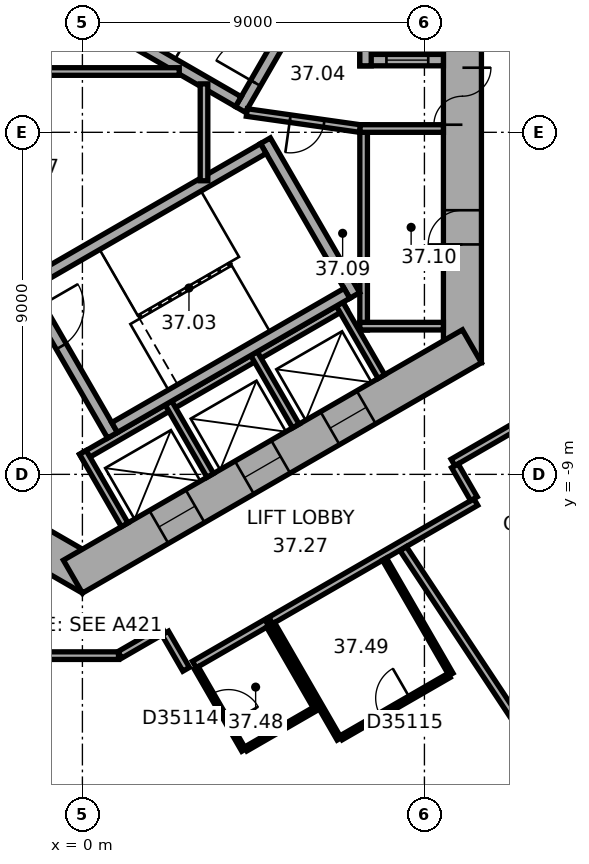
"""IFC4 building model, lengths in metres.
Left out: names, types, materials, properties, quantities, classifications, styles, units other than length and angle.
Written with IfcOpenShell. Run it as: python <this file> out.ifc"""

import sys

from ifc_helpers import new_model, si_unit, direction, frame, frame_2d, origin, place, context, subcontext, project, spatial, rectangle, extrude, element, fill, save


model = new_model("IFC4")
c1 = context("Model", 3, precision=1e-05, world=origin(), true_north=direction((0.0, 1.0)))
c2 = subcontext(c1, "Body", "Model", "MODEL_VIEW")
j1 = project(units=[si_unit("LENGTHUNIT", "METRE"), si_unit("PLANEANGLEUNIT", "RADIAN")], contexts=[c1])
p1 = place(None, origin())
s1 = spatial("IfcSite", under=j1, at=p1, CompositionType="ELEMENT")
p2 = place(p1, origin())
s2 = spatial("IfcBuilding", under=s1, at=p2, CompositionType="ELEMENT")
p3 = place(p2, frame((0.0, 0.0, 154.0)))
s3 = spatial("IfcBuildingStorey", under=s2, at=p3, CompositionType="ELEMENT", Elevation=154.0)
p4 = place(p3, frame((10.0, -6.062, 0.0), z_axis=(0.0, 0.0, 1.0), x_axis=(0.0, 1.0, 0.0)))
e1 = element("IfcWall", 1, at=p4, inside=s3, PredefinedType="SHEAR", context=c2, shape_type="SweptSolid", body=[
    extrude(rectangle(XDim=12.125, YDim=1.0, at=frame_2d((6.062, 0.0))), origin(), (0.0, 0.0, 1.0), 3.7),
])
p5 = place(p4, frame((6.262, 0.0, 0.0)))
e2 = element("IfcOpeningElement", 2, at=p5, cuts=e1, PredefinedType="OPENING", context=c2, shape_type="SweptSolid", body=[
    extrude(rectangle(XDim=1.5, YDim=2.1, at=frame_2d((0.75, 1.05))), frame((0.0, 0.51, 0.0), z_axis=(0.0, -1.0, 0.0), x_axis=(1.0, 0.0, 0.0)), (0.0, 0.0, 1.0), 1.02),
])
p6 = place(p4, frame((3.112, 0.0, 0.0)))
e3 = element("IfcOpeningElement", 3, at=p6, cuts=e1, PredefinedType="OPENING", context=c2, shape_type="SweptSolid", body=[
    extrude(rectangle(XDim=0.9, YDim=2.1, at=frame_2d((0.45, 1.05))), frame((0.0, 0.51, 0.0), z_axis=(0.0, -1.0, 0.0), x_axis=(1.0, 0.0, 0.0)), (0.0, 0.0, 1.0), 1.02),
])
p7 = place(p3, frame((-10.25, -5.629, 0.0), z_axis=(0.0, 0.0, 1.0), x_axis=(0.866022616891, -0.50000482701, 0.0)))
e4 = element("IfcWall", 4, at=p7, inside=s3, PredefinedType="SHEAR", context=c2, shape_type="SweptSolid", body=[
    extrude(rectangle(XDim=12.125, YDim=1.0, at=frame_2d((6.062, 0.0))), origin(), (0.0, 0.0, 1.0), 3.7),
])
p8 = place(p7, frame((6.262, 0.0, 0.0)))
e5 = element("IfcOpeningElement", 5, at=p8, cuts=e4, PredefinedType="OPENING", context=c2, shape_type="SweptSolid", body=[
    extrude(rectangle(XDim=1.5, YDim=2.1, at=frame_2d((0.75, 1.05))), frame((0.0, 0.51, 0.0), z_axis=(0.0, -1.0, 0.0), x_axis=(1.0, 0.0, 0.0)), (0.0, 0.0, 1.0), 1.02),
])
p9 = place(p7, frame((1.712, 0.0, 0.0)))
e6 = element("IfcOpeningElement", 6, at=p9, cuts=e4, PredefinedType="OPENING", context=c2, shape_type="SweptSolid", body=[
    extrude(rectangle(XDim=1.1, YDim=2.1, at=frame_2d((0.55, 1.05))), frame((0.0, 0.51, 0.0), z_axis=(0.0, -1.0, 0.0), x_axis=(1.0, 0.0, 0.0)), (0.0, 0.0, 1.0), 1.02),
])
p10 = place(p7, frame((4.312, 0.0, 0.0)))
e7 = element("IfcOpeningElement", 7, at=p10, cuts=e4, PredefinedType="OPENING", context=c2, shape_type="SweptSolid", body=[
    extrude(rectangle(XDim=1.1, YDim=2.1, at=frame_2d((0.55, 1.05))), frame((0.0, 0.51, 0.0), z_axis=(0.0, -1.0, 0.0), x_axis=(1.0, 0.0, 0.0)), (0.0, 0.0, 1.0), 1.02),
])
p11 = place(p3, frame((-0.25, -11.691, 0.0), z_axis=(0.0, 0.0, 1.0), x_axis=(0.866022616891, 0.50000482701, 0.0)))
e8 = element("IfcWall", 8, at=p11, inside=s3, PredefinedType="SHEAR", context=c2, shape_type="SweptSolid", body=[
    extrude(rectangle(XDim=12.125, YDim=1.0, at=frame_2d((6.062, 0.0))), origin(), (0.0, 0.0, 1.0), 3.7),
])
p12 = place(p11, frame((2.612, 0.0, 0.0)))
e9 = element("IfcOpeningElement", 9, at=p12, cuts=e8, PredefinedType="OPENING", context=c2, shape_type="SweptSolid", body=[
    extrude(rectangle(XDim=1.1, YDim=2.1, at=frame_2d((0.55, 1.05))), frame((0.0, 0.51, 0.0), z_axis=(0.0, -1.0, 0.0), x_axis=(1.0, 0.0, 0.0)), (0.0, 0.0, 1.0), 1.02),
])
p13 = place(p11, frame((5.212, 0.0, 0.0)))
e10 = element("IfcOpeningElement", 10, at=p13, cuts=e8, PredefinedType="OPENING", context=c2, shape_type="SweptSolid", body=[
    extrude(rectangle(XDim=1.1, YDim=2.1, at=frame_2d((0.55, 1.05))), frame((0.0, 0.51, 0.0), z_axis=(0.0, -1.0, 0.0), x_axis=(1.0, 0.0, 0.0)), (0.0, 0.0, 1.0), 1.02),
])
p14 = place(p11, frame((7.812, 0.0, 0.0)))
e11 = element("IfcOpeningElement", 11, at=p14, cuts=e8, PredefinedType="OPENING", context=c2, shape_type="SweptSolid", body=[
    extrude(rectangle(XDim=1.1, YDim=2.1, at=frame_2d((0.55, 1.05))), frame((0.0, 0.51, 0.0), z_axis=(0.0, -1.0, 0.0), x_axis=(1.0, 0.0, 0.0)), (0.0, 0.0, 1.0), 1.02),
])
p15 = place(p3, frame((2.911, -24.156, 0.0), z_axis=(0.0, 0.0, 1.0), x_axis=(0.833882163564, 0.551942512668, 0.0)))
e12 = element("IfcWall", 12, at=p15, inside=s3, PredefinedType="STANDARD", context=c2, shape_type="SweptSolid", body=[
    extrude(rectangle(XDim=20.044, YDim=0.2, at=frame_2d((10.022, 0.0))), origin(), (0.0, 0.0, 1.0), 3.7),
])
p16 = place(p15, frame((1.313, 0.0, 0.9)))
e13 = element("IfcOpeningElement", 13, at=p16, cuts=e12, PredefinedType="OPENING", context=c2, shape_type="SweptSolid", body=[
    extrude(rectangle(XDim=2.4, YDim=2.0, at=frame_2d((1.2, 1.0))), frame((0.0, 0.11, 0.0), z_axis=(0.0, -1.0, 0.0), x_axis=(1.0, 0.0, 0.0)), (0.0, 0.0, 1.0), 0.22),
])
p17 = place(p15, frame((5.067, 0.0, 0.9)))
e14 = element("IfcOpeningElement", 14, at=p17, cuts=e12, PredefinedType="OPENING", context=c2, shape_type="SweptSolid", body=[
    extrude(rectangle(XDim=2.4, YDim=2.0, at=frame_2d((1.2, 1.0))), frame((0.0, 0.11, 0.0), z_axis=(0.0, -1.0, 0.0), x_axis=(1.0, 0.0, 0.0)), (0.0, 0.0, 1.0), 0.22),
])
p18 = place(p15, frame((8.821, 0.0, 0.9)))
e15 = element("IfcOpeningElement", 15, at=p18, cuts=e12, PredefinedType="OPENING", context=c2, shape_type="SweptSolid", body=[
    extrude(rectangle(XDim=2.4, YDim=2.0, at=frame_2d((1.2, 1.0))), frame((0.0, 0.11, 0.0), z_axis=(0.0, -1.0, 0.0), x_axis=(1.0, 0.0, 0.0)), (0.0, 0.0, 1.0), 0.22),
])
p19 = place(p15, frame((12.575, 0.0, 0.9)))
e16 = element("IfcOpeningElement", 16, at=p19, cuts=e12, PredefinedType="OPENING", context=c2, shape_type="SweptSolid", body=[
    extrude(rectangle(XDim=2.4, YDim=2.0, at=frame_2d((1.2, 1.0))), frame((0.0, 0.11, 0.0), z_axis=(0.0, -1.0, 0.0), x_axis=(1.0, 0.0, 0.0)), (0.0, 0.0, 1.0), 0.22),
])
p20 = place(p15, frame((16.329, 0.0, 0.9)))
e17 = element("IfcOpeningElement", 17, at=p20, cuts=e12, PredefinedType="OPENING", context=c2, shape_type="SweptSolid", body=[
    extrude(rectangle(XDim=2.4, YDim=2.0, at=frame_2d((1.2, 1.0))), frame((0.0, 0.11, 0.0), z_axis=(0.0, -1.0, 0.0), x_axis=(1.0, 0.0, 0.0)), (0.0, 0.0, 1.0), 0.22),
])
p21 = place(p3, frame((7.4, -5.2, 0.0), z_axis=(0.0, 0.0, 1.0), x_axis=(0.0, 1.0, 0.0)))
e18 = element("IfcWall", 18, at=p21, inside=s3, PredefinedType="PARTITIONING", context=c2, shape_type="SweptSolid", body=[
    extrude(rectangle(XDim=5.4, YDim=0.2, at=frame_2d((2.7, 0.0))), origin(), (0.0, 0.0, 1.0), 3.42),
])
for number, where, z_axis, x_axis in (
    (19, (7.3, -5.1, 0.0), (0.0, 0.0, 1.0), (1.0, 0.0, 0.0)),
    (20, (7.3, 0.1, 0.0), (0.0, 0.0, 1.0), (1.0, 0.0, 0.0)),
):
    element("IfcWall", number, at=place(p3, frame(where, z_axis=z_axis, x_axis=x_axis)), inside=s3, PredefinedType="PARTITIONING", context=c2, shape_type="SweptSolid", body=[
        extrude(rectangle(XDim=2.2, YDim=0.2, at=frame_2d((1.1, 0.0))), origin(), (0.0, 0.0, 1.0), 3.42),
    ])
p22 = place(p3, frame((-0.024, -8.559, 0.0), z_axis=(0.0, 0.0, 1.0), x_axis=(0.866026010844, 0.49999894854, 0.0)))
e21 = element("IfcWall", 21, at=p22, inside=s3, PredefinedType="PARTITIONING", context=c2, shape_type="SweptSolid", body=[
    extrude(rectangle(XDim=8.0, YDim=0.2, at=frame_2d((4.0, 0.0))), origin(), (0.0, 0.0, 1.0), 3.42),
])
for number, where, z_axis, x_axis in (
    (22, (0.013, -8.422, 0.0), (0.0, 0.0, 1.0), (0.5, -0.866, 0.0)),
    (23, (2.264, -7.122, 0.0), (0.0, 0.0, 1.0), (0.5, -0.866, 0.0)),
    (24, (4.516, -5.822, 0.0), (0.0, 0.0, 1.0), (0.5, -0.866, 0.0)),
    (25, (6.768, -4.522, 0.0), (0.0, 0.0, 1.0), (0.5, -0.866, 0.0)),
):
    element("IfcWall", number, at=place(p3, frame(where, z_axis=z_axis, x_axis=x_axis)), inside=s3, PredefinedType="PARTITIONING", context=c2, shape_type="SweptSolid", body=[
        extrude(rectangle(XDim=2.2, YDim=0.2, at=frame_2d((1.1, 0.0))), origin(), (0.0, 0.0, 1.0), 3.42),
    ])
p23 = place(p3, frame((4.158, 0.602, 0.0), z_axis=(0.0, 0.0, 1.0), x_axis=(0.499977259774, 0.866038532462, 0.0)))
e26 = element("IfcWall", 26, at=p23, inside=s3, PredefinedType="SHEAR", context=c2, shape_type="SweptSolid", body=[
    extrude(rectangle(XDim=4.7, YDim=0.3, at=frame_2d((2.35, 0.0))), origin(), (0.0, 0.0, 1.0), 3.42),
])
p24 = place(p23, frame((0.8, 0.0, 0.0)))
e27 = element("IfcOpeningElement", 27, at=p24, cuts=e26, PredefinedType="OPENING", context=c2, shape_type="SweptSolid", body=[
    extrude(rectangle(XDim=1.2, YDim=2.1, at=frame_2d((0.6, 1.05))), frame((0.0, 0.16, 0.0), z_axis=(0.0, -1.0, 0.0), x_axis=(1.0, 0.0, 0.0)), (0.0, 0.0, 1.0), 0.32),
])
p25 = place(p3, frame((4.103, 0.807, 0.0), z_axis=(0.0, 0.0, 1.0), x_axis=(-0.866027801685, 0.499995846692, 0.0)))
e28 = element("IfcWall", 28, at=p25, inside=s3, PredefinedType="SHEAR", context=c2, shape_type="SweptSolid", body=[
    extrude(rectangle(XDim=7.06, YDim=0.3, at=frame_2d((3.53, 0.0))), origin(), (0.0, 0.0, 1.0), 3.42),
])
p26 = place(p3, frame((-1.558, -3.902, 0.0), z_axis=(0.0, 0.0, 1.0), x_axis=(0.499977259774, -0.866038532462, 0.0)))
e29 = element("IfcWall", 29, at=p26, inside=s3, PredefinedType="SHEAR", context=c2, shape_type="SweptSolid", body=[
    extrude(rectangle(XDim=4.7, YDim=0.3, at=frame_2d((2.35, 0.0))), origin(), (0.0, 0.0, 1.0), 3.42),
])
p27 = place(p26, frame((0.8, 0.0, 0.0)))
e30 = element("IfcOpeningElement", 30, at=p27, cuts=e29, PredefinedType="OPENING", context=c2, shape_type="SweptSolid", body=[
    extrude(rectangle(XDim=1.2, YDim=2.1, at=frame_2d((0.6, 1.05))), frame((0.0, 0.16, 0.0), z_axis=(0.0, -1.0, 0.0), x_axis=(1.0, 0.0, 0.0)), (0.0, 0.0, 1.0), 0.32),
])
p28 = place(p3, frame((4.816, -0.222, 0.0), z_axis=(0.0, 0.0, 1.0), x_axis=(0.499977259774, -0.866038532462, 0.0)))
e31 = element("IfcWall", 31, at=p28, inside=s3, PredefinedType="SHEAR", context=c2, shape_type="SweptSolid", body=[
    extrude(rectangle(XDim=4.7, YDim=0.3, at=frame_2d((2.35, 0.0))), origin(), (0.0, 0.0, 1.0), 3.42),
])
for number, where, z_axis, x_axis in (
    (32, (-1.353, -3.957, 0.0), (0.0, 0.0, 1.0), (0.866, 0.5, 0.0)),
    (33, (0.847, -7.767, 0.0), (0.0, 0.0, 1.0), (0.866, 0.5, 0.0)),
):
    element("IfcWall", number, at=place(p3, frame(where, z_axis=z_axis, x_axis=x_axis)), inside=s3, PredefinedType="SHEAR", context=c2, shape_type="SweptSolid", body=[
        extrude(rectangle(XDim=7.06, YDim=0.3, at=frame_2d((3.53, 0.0))), origin(), (0.0, 0.0, 1.0), 3.42),
    ])
p29 = place(p3, frame((7.3, 1.9, 0.0), z_axis=(0.0, 0.0, 1.0), x_axis=(1.0, 0.0, 0.0)))
e34 = element("IfcWall", 34, at=p29, inside=s3, PredefinedType="SHEAR", context=c2, shape_type="SweptSolid", body=[
    extrude(rectangle(XDim=2.2, YDim=0.3, at=frame_2d((1.1, 0.0))), origin(), (0.0, 0.0, 1.0), 3.42),
])
p30 = place(p29, frame((0.7, 0.0, 0.0)))
e35 = element("IfcOpeningElement", 35, at=p30, cuts=e34, PredefinedType="OPENING", context=c2, shape_type="SweptSolid", body=[
    extrude(rectangle(XDim=1.1, YDim=2.1, at=frame_2d((0.55, 1.05))), frame((0.0, 0.16, 0.0), z_axis=(0.0, -1.0, 0.0), x_axis=(1.0, 0.0, 0.0)), (0.0, 0.0, 1.0), 0.32),
])
p31 = place(p3, frame((7.45, 1.75, 0.0), z_axis=(0.0, 0.0, 1.0), x_axis=(0.0, 1.0, 0.0)))
e36 = element("IfcWall", 36, at=p31, inside=s3, PredefinedType="SHEAR", context=c2, shape_type="SweptSolid", body=[
    extrude(rectangle(XDim=3.35, YDim=0.3, at=frame_2d((1.675, 0.0))), origin(), (0.0, 0.0, 1.0), 3.42),
])
p32 = place(p3, frame((4.327, 0.521, 0.0), z_axis=(0.0, 0.0, 1.0), x_axis=(0.990124376366, -0.14019172346, 0.0)))
e37 = element("IfcWall", 37, at=p32, inside=s3, PredefinedType="PARTITIONING", context=c2, shape_type="SweptSolid", body=[
    extrude(rectangle(XDim=3.002, YDim=0.2, at=frame_2d((1.501, 0.0))), origin(), (0.0, 0.0, 1.0), 3.42),
])
p33 = place(p32, frame((1.15, 0.0, 0.0)))
e38 = element("IfcOpeningElement", 38, at=p33, cuts=e37, PredefinedType="OPENING", context=c2, shape_type="SweptSolid", body=[
    extrude(rectangle(XDim=0.9, YDim=2.1, at=frame_2d((0.45, 1.05))), frame((0.0, 0.11, 0.0), z_axis=(0.0, -1.0, 0.0), x_axis=(1.0, 0.0, 0.0)), (0.0, 0.0, 1.0), 0.22),
])
p34 = place(p3, frame((-2.72, 1.6, 0.0), z_axis=(0.0, 0.0, 1.0), x_axis=(1.0, 0.0, 0.0)))
e39 = element("IfcWall", 39, at=p34, inside=s3, PredefinedType="PARTITIONING", context=c2, shape_type="SweptSolid", body=[
    extrude(rectangle(XDim=5.269, YDim=0.2, at=frame_2d((2.634, 0.0))), origin(), (0.0, 0.0, 1.0), 3.42),
])
p35 = place(p3, frame((3.2, -1.275, 0.0), z_axis=(0.0, 0.0, 1.0), x_axis=(0.0, 1.0, 0.0)))
e40 = element("IfcWall", 40, at=p35, inside=s3, PredefinedType="PARTITIONING", context=c2, shape_type="SweptSolid", body=[
    extrude(rectangle(XDim=2.549, YDim=0.2, at=frame_2d((1.275, 0.0))), origin(), (0.0, 0.0, 1.0), 3.42),
])
p36 = place(p3, frame((-0.91, -13.77, 0.0), z_axis=(0.0, 0.0, 1.0), x_axis=(1.0, 0.0, 0.0)))
e41 = element("IfcWall", 41, at=p36, inside=s3, PredefinedType="PARTITIONING", context=c2, shape_type="SweptSolid", body=[
    extrude(rectangle(XDim=1.86, YDim=0.2, at=frame_2d((0.93, 0.0))), origin(), (0.0, 0.0, 1.0), 3.42),
])
p37 = place(p3, frame((0.985, -13.75, 0.0), z_axis=(0.0, 0.0, 1.0), x_axis=(0.866028661061, 0.499994358189, 0.0)))
e42 = element("IfcWall", 42, at=p37, inside=s3, PredefinedType="PARTITIONING", context=c2, shape_type="SweptSolid", body=[
    extrude(rectangle(XDim=1.321, YDim=0.2, at=frame_2d((0.661, 0.0))), origin(), (0.0, 0.0, 1.0), 3.42),
])
p38 = place(p3, frame((2.179, -13.176, 0.0), z_axis=(0.0, 0.0, 1.0), x_axis=(0.499978356969, -0.866037899034, 0.0)))
e43 = element("IfcWall", 43, at=p38, inside=s3, PredefinedType="PARTITIONING", context=c2, shape_type="SweptSolid", body=[
    extrude(rectangle(XDim=1.101, YDim=0.2, at=frame_2d((0.551, 0.0))), origin(), (0.0, 0.0, 1.0), 3.42),
])
p39 = place(p3, frame((2.946, -14.004, 0.0), z_axis=(0.0, 0.0, 1.0), x_axis=(0.866008176907, 0.50002983664, 0.0)))
e44 = element("IfcWall", 44, at=p39, inside=s3, PredefinedType="PARTITIONING", context=c2, shape_type="SweptSolid", body=[
    extrude(rectangle(XDim=2.2, YDim=0.2, at=frame_2d((1.1, 0.0))), origin(), (0.0, 0.0, 1.0), 3.42),
])
p40 = place(p3, frame((4.246, -16.256, 0.0), z_axis=(0.0, 0.0, 1.0), x_axis=(-0.499961950354, 0.866047370643, 0.0)))
e45 = element("IfcWall", 45, at=p40, inside=s3, PredefinedType="PARTITIONING", context=c2, shape_type="SweptSolid", body=[
    extrude(rectangle(XDim=2.5, YDim=0.12, at=frame_2d((1.25, 0.0))), origin(), (0.0, 0.0, 1.0), 3.42),
])
p41 = place(p40, frame((0.8, 0.0, 0.0)))
e46 = element("IfcOpeningElement", 46, at=p41, cuts=e45, PredefinedType="OPENING", context=c2, shape_type="SweptSolid", body=[
    extrude(rectangle(XDim=0.9, YDim=2.1, at=frame_2d((0.45, 1.05))), frame((0.0, 0.07, 0.0), z_axis=(0.0, -1.0, 0.0), x_axis=(1.0, 0.0, 0.0)), (0.0, 0.0, 1.0), 0.14),
])
p42 = place(p3, frame((4.901, -12.991, 0.0), z_axis=(0.0, 0.0, 1.0), x_axis=(0.500004234368, -0.866022959057, 0.0)))
e47 = element("IfcWall", 47, at=p42, inside=s3, PredefinedType="PARTITIONING", context=c2, shape_type="SweptSolid", body=[
    extrude(rectangle(XDim=2.5, YDim=0.12, at=frame_2d((1.25, 0.0))), origin(), (0.0, 0.0, 1.0), 3.42),
])
p43 = place(p3, frame((4.955, -12.844, 0.0), z_axis=(0.0, 0.0, 1.0), x_axis=(0.86602379309, 0.500002789795, 0.0)))
e48 = element("IfcWall", 48, at=p43, inside=s3, PredefinedType="PARTITIONING", context=c2, shape_type="SweptSolid", body=[
    extrude(rectangle(XDim=6.232, YDim=0.2, at=frame_2d((3.116, 0.0))), origin(), (0.0, 0.0, 1.0), 3.42),
])
p44 = place(p3, frame((6.099, -15.186, 0.0), z_axis=(0.0, 0.0, 1.0), x_axis=(-0.866009661879, -0.500027264788, 0.0)))
e49 = element("IfcWall", 49, at=p44, inside=s3, PredefinedType="PARTITIONING", context=c2, shape_type="SweptSolid", body=[
    extrude(rectangle(XDim=2.08, YDim=0.12, at=frame_2d((1.04, 0.0))), origin(), (0.0, 0.0, 1.0), 3.42),
])
for number, where, z_axis, x_axis in (
    (50, (6.755, -15.962, 0.0), (0.0, 0.0, 1.0), (-0.5, 0.866, 0.0)),
    (51, (7.949, -11.231, 0.0), (0.0, 0.0, 1.0), (0.5, -0.866, 0.0)),
):
    element("IfcWall", number, at=place(p3, frame(where, z_axis=z_axis, x_axis=x_axis)), inside=s3, PredefinedType="PARTITIONING", context=c2, shape_type="SweptSolid", body=[
        extrude(rectangle(XDim=3.5, YDim=0.12, at=frame_2d((1.75, 0.0))), origin(), (0.0, 0.0, 1.0), 3.42),
    ])
p45 = place(p3, frame((9.647, -14.292, 0.0), z_axis=(0.0, 0.0, 1.0), x_axis=(-0.866040564224, -0.499973740429, 0.0)))
e52 = element("IfcWall", 52, at=p45, inside=s3, PredefinedType="PARTITIONING", context=c2, shape_type="SweptSolid", body=[
    extrude(rectangle(XDim=3.28, YDim=0.12, at=frame_2d((1.64, 0.0))), origin(), (0.0, 0.0, 1.0), 3.42),
])
p46 = place(p45, frame((1.19, 0.0, 0.0)))
e53 = element("IfcOpeningElement", 53, at=p46, cuts=e52, PredefinedType="OPENING", context=c2, shape_type="SweptSolid", body=[
    extrude(rectangle(XDim=0.9, YDim=2.1, at=frame_2d((0.45, 1.05))), frame((0.0, 0.07, 0.0), z_axis=(0.0, -1.0, 0.0), x_axis=(1.0, 0.0, 0.0)), (0.0, 0.0, 1.0), 0.14),
])
p47 = place(p3, frame((9.752, -8.688, 0.0), z_axis=(0.0, 0.0, 1.0), x_axis=(0.865974105138, 0.500088841337, 0.0)))
e54 = element("IfcWall", 54, at=p47, inside=s3, PredefinedType="PARTITIONING", context=c2, shape_type="SweptSolid", body=[
    extrude(rectangle(XDim=1.961, YDim=0.2, at=frame_2d((0.98, 0.0))), origin(), (0.0, 0.0, 1.0), 3.42),
])
p48 = place(p3, frame((10.302, -9.642, 0.0), z_axis=(0.0, 0.0, 1.0), x_axis=(-0.500074377092, 0.865982457891, 0.0)))
e55 = element("IfcWall", 55, at=p48, inside=s3, PredefinedType="PARTITIONING", context=c2, shape_type="SweptSolid", body=[
    extrude(rectangle(XDim=1.001, YDim=0.2, at=frame_2d((0.5, 0.0))), origin(), (0.0, 0.0, 1.0), 3.42),
])
p49 = place(p3, frame((12.281, -16.755, 0.0), z_axis=(0.0, 0.0, 1.0), x_axis=(-0.551925794663, 0.833893228888, 0.0)))
e56 = element("IfcWall", 56, at=p49, inside=s3, PredefinedType="PARTITIONING", context=c2, shape_type="SweptSolid", body=[
    extrude(rectangle(XDim=6.953, YDim=0.2, at=frame_2d((3.476, 0.0))), origin(), (0.0, 0.0, 1.0), 3.42),
])
p50 = place(p5, origin())
e57 = element("IfcDoor", 57, at=p50, inside=s3, OperationType="DOUBLE_DOOR_SINGLE_SWING", PredefinedType="DOOR", context=c2, shape_type="SweptSolid", body=[
    extrude(rectangle(XDim=1.5, YDim=2.1, at=frame_2d((0.75, 1.05))), frame((0.0, 0.025, 0.0), z_axis=(0.0, -1.0, 0.0), x_axis=(1.0, 0.0, 0.0)), (0.0, 0.0, 1.0), 0.05),
])
fill(e2, e57)
p51 = place(p24, origin())
e58 = element("IfcDoor", 58, at=p51, inside=s3, OperationType="SINGLE_SWING_RIGHT", PredefinedType="DOOR", context=c2, shape_type="SweptSolid", body=[
    extrude(rectangle(XDim=1.2, YDim=2.1, at=frame_2d((0.6, 1.05))), frame((0.0, 0.025, 0.0), z_axis=(0.0, -1.0, 0.0), x_axis=(1.0, 0.0, 0.0)), (0.0, 0.0, 1.0), 0.05),
])
fill(e27, e58)
p52 = place(p27, origin())
e59 = element("IfcDoor", 59, at=p52, inside=s3, OperationType="SINGLE_SWING_RIGHT", PredefinedType="DOOR", context=c2, shape_type="SweptSolid", body=[
    extrude(rectangle(XDim=1.2, YDim=2.1, at=frame_2d((0.6, 1.05))), frame((0.0, 0.025, 0.0), z_axis=(0.0, -1.0, 0.0), x_axis=(1.0, 0.0, 0.0)), (0.0, 0.0, 1.0), 0.05),
])
fill(e30, e59)
p53 = place(p33, origin())
e60 = element("IfcDoor", 60, at=p53, inside=s3, OperationType="SINGLE_SWING_LEFT", PredefinedType="DOOR", context=c2, shape_type="SweptSolid", body=[
    extrude(rectangle(XDim=0.9, YDim=2.1, at=frame_2d((0.45, 1.05))), frame((0.0, 0.025, 0.0), z_axis=(0.0, -1.0, 0.0), x_axis=(1.0, 0.0, 0.0)), (0.0, 0.0, 1.0), 0.05),
])
fill(e38, e60)
p54 = place(p6, origin())
e61 = element("IfcDoor", 61, at=p54, inside=s3, OperationType="SINGLE_SWING_LEFT", PredefinedType="DOOR", context=c2, shape_type="SweptSolid", body=[
    extrude(rectangle(XDim=0.9, YDim=2.1, at=frame_2d((0.45, 1.05))), frame((0.0, 0.025, 0.0), z_axis=(0.0, -1.0, 0.0), x_axis=(1.0, 0.0, 0.0)), (0.0, 0.0, 1.0), 0.05),
])
fill(e3, e61)
p55 = place(p30, origin())
e62 = element("IfcDoor", 62, at=p55, inside=s3, OperationType="DOUBLE_DOOR_SLIDING", PredefinedType="DOOR", context=c2, shape_type="SweptSolid", body=[
    extrude(rectangle(XDim=1.1, YDim=2.1, at=frame_2d((0.55, 1.05))), frame((0.0, 0.025, 0.0), z_axis=(0.0, -1.0, 0.0), x_axis=(1.0, 0.0, 0.0)), (0.0, 0.0, 1.0), 0.05),
])
fill(e35, e62)
p56 = place(p12, origin())
e63 = element("IfcDoor", 63, at=p56, inside=s3, OperationType="DOUBLE_DOOR_SLIDING", PredefinedType="DOOR", context=c2, shape_type="SweptSolid", body=[
    extrude(rectangle(XDim=1.1, YDim=2.1, at=frame_2d((0.55, 1.05))), frame((0.0, 0.025, 0.0), z_axis=(0.0, -1.0, 0.0), x_axis=(1.0, 0.0, 0.0)), (0.0, 0.0, 1.0), 0.05),
])
fill(e9, e63)
p57 = place(p13, origin())
e64 = element("IfcDoor", 64, at=p57, inside=s3, OperationType="DOUBLE_DOOR_SLIDING", PredefinedType="DOOR", context=c2, shape_type="SweptSolid", body=[
    extrude(rectangle(XDim=1.1, YDim=2.1, at=frame_2d((0.55, 1.05))), frame((0.0, 0.025, 0.0), z_axis=(0.0, -1.0, 0.0), x_axis=(1.0, 0.0, 0.0)), (0.0, 0.0, 1.0), 0.05),
])
fill(e10, e64)
p58 = place(p14, origin())
e65 = element("IfcDoor", 65, at=p58, inside=s3, OperationType="DOUBLE_DOOR_SLIDING", PredefinedType="DOOR", context=c2, shape_type="SweptSolid", body=[
    extrude(rectangle(XDim=1.1, YDim=2.1, at=frame_2d((0.55, 1.05))), frame((0.0, 0.025, 0.0), z_axis=(0.0, -1.0, 0.0), x_axis=(1.0, 0.0, 0.0)), (0.0, 0.0, 1.0), 0.05),
])
fill(e11, e65)
p59 = place(p41, origin())
e66 = element("IfcDoor", 66, at=p59, inside=s3, OperationType="SINGLE_SWING_LEFT", PredefinedType="DOOR", context=c2, shape_type="SweptSolid", body=[
    extrude(rectangle(XDim=0.9, YDim=2.1, at=frame_2d((0.45, 1.05))), frame((0.0, 0.025, 0.0), z_axis=(0.0, -1.0, 0.0), x_axis=(1.0, 0.0, 0.0)), (0.0, 0.0, 1.0), 0.05),
])
fill(e46, e66)
p60 = place(p46, origin())
e67 = element("IfcDoor", 67, at=p60, inside=s3, OperationType="SINGLE_SWING_LEFT", PredefinedType="DOOR", context=c2, shape_type="SweptSolid", body=[
    extrude(rectangle(XDim=0.9, YDim=2.1, at=frame_2d((0.45, 1.05))), frame((0.0, 0.025, 0.0), z_axis=(0.0, -1.0, 0.0), x_axis=(1.0, 0.0, 0.0)), (0.0, 0.0, 1.0), 0.05),
])
fill(e53, e67)
save(model, sys.argv[1])
